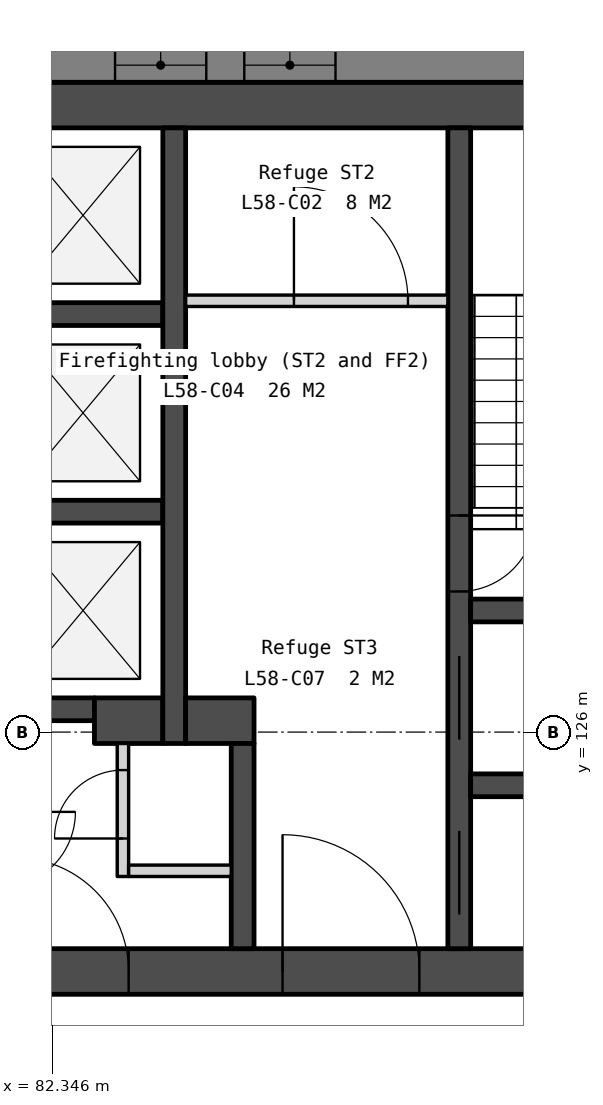
"""IFC4 building model, lengths in metres.
Left out: names, types, materials, properties, quantities, classifications, styles, units other than length and angle.
Written with IfcOpenShell. Run it as: python <this file> out.ifc"""

import sys

from ifc_helpers import new_model, si_unit, direction, frame, frame_2d, origin, place, context, subcontext, project, spatial, polyline, rectangle, outline, extrude, element, fill, save


model = new_model("IFC4")
c1 = context("Model", 3, precision=1e-05, world=origin(), true_north=direction((0.0, 1.0)))
c2 = subcontext(c1, "Body", "Model", "MODEL_VIEW")
j1 = project(units=[si_unit("LENGTHUNIT", "METRE"), si_unit("PLANEANGLEUNIT", "RADIAN")], contexts=[c1])
p1 = place(None, origin())
s1 = spatial("IfcSite", under=j1, at=p1, CompositionType="ELEMENT")
p2 = place(p1, origin())
s2 = spatial("IfcBuilding", under=s1, at=p2, CompositionType="ELEMENT")
p3 = place(p2, frame((0.0, 0.0, 238.7)))
s3 = spatial("IfcBuildingStorey", under=s2, at=p3, CompositionType="ELEMENT", Elevation=238.7)
p4 = place(p3, frame((69.0, 134.25, 0.0), z_axis=(0.0, 0.0, 1.0), x_axis=(1.0, 0.0, 0.0)))
e1 = element("IfcWall", 1, at=p4, inside=s3, PredefinedType="SOLIDWALL", context=c2, shape_type="SweptSolid", body=[
    extrude(rectangle(XDim=22.0, YDim=0.6, at=frame_2d((11.0, 0.0))), origin(), (0.0, 0.0, 1.0), 3.75),
])
p5 = place(p3, frame((69.0, 122.85, 0.0), z_axis=(0.0, 0.0, 1.0), x_axis=(1.0, 0.0, 0.0)))
e2 = element("IfcWall", 2, at=p5, inside=s3, PredefinedType="SOLIDWALL", context=c2, shape_type="SweptSolid", body=[
    extrude(rectangle(XDim=22.0, YDim=0.6, at=frame_2d((11.0, 0.0))), origin(), (0.0, 0.0, 1.0), 3.75),
])
p6 = place(p5, frame((16.375, 0.0, 0.0)))
e3 = element("IfcOpeningElement", 3, at=p6, cuts=e2, PredefinedType="OPENING", context=c2, shape_type="SweptSolid", body=[
    extrude(rectangle(XDim=1.8, YDim=2.1, at=frame_2d((0.9, 1.05))), frame((0.0, 0.31, 0.0), z_axis=(0.0, -1.0, 0.0), x_axis=(1.0, 0.0, 0.0)), (0.0, 0.0, 1.0), 0.62),
])
p7 = place(p5, frame((3.825, 0.0, 0.0)))
e4 = element("IfcOpeningElement", 4, at=p7, cuts=e2, PredefinedType="OPENING", context=c2, shape_type="SweptSolid", body=[
    extrude(rectangle(XDim=1.8, YDim=2.1, at=frame_2d((0.9, 1.05))), frame((0.0, 0.31, 0.0), z_axis=(0.0, -1.0, 0.0), x_axis=(1.0, 0.0, 0.0)), (0.0, 0.0, 1.0), 0.62),
])
p8 = place(p5, frame((12.85, 0.0, 0.0)))
e5 = element("IfcOpeningElement", 5, at=p8, cuts=e2, PredefinedType="OPENING", context=c2, shape_type="SweptSolid", body=[
    extrude(rectangle(XDim=1.5, YDim=2.1, at=frame_2d((0.75, 1.05))), frame((0.0, 0.31, 0.0), z_axis=(0.0, -1.0, 0.0), x_axis=(1.0, 0.0, 0.0)), (0.0, 0.0, 1.0), 0.62),
])
for number, where, z_axis, x_axis in (
    (6, (81.7, 131.5, 0.0), (0.0, 0.0, 1.0), (1.0, 0.0, 0.0)),
    (7, (81.7, 128.9, 0.0), (0.0, 0.0, 1.0), (1.0, 0.0, 0.0)),
):
    element("IfcWall", number, at=place(p3, frame(where, z_axis=z_axis, x_axis=x_axis)), inside=s3, PredefinedType="SOLIDWALL", context=c2, shape_type="SweptSolid", body=[
        extrude(rectangle(XDim=2.1, YDim=0.3, at=frame_2d((1.05, 0.0))), origin(), (0.0, 0.0, 1.0), 3.75),
    ])
p9 = place(p3, frame((81.7, 126.3, 0.0), z_axis=(0.0, 0.0, 1.0), x_axis=(1.0, 0.0, 0.0)))
e8 = element("IfcWall", 8, at=p9, inside=s3, PredefinedType="SOLIDWALL", context=c2, shape_type="SweptSolid", body=[
    extrude(rectangle(XDim=1.2, YDim=0.3, at=frame_2d((0.6, 0.0))), origin(), (0.0, 0.0, 1.0), 3.75),
])
p10 = place(p3, frame((82.9, 126.15, 0.0), z_axis=(0.0, 0.0, 1.0), x_axis=(1.0, 0.0, 0.0)))
e9 = element("IfcWall", 9, at=p10, inside=s3, PredefinedType="SOLIDWALL", context=c2, shape_type="SweptSolid", body=[
    extrude(rectangle(XDim=0.9, YDim=0.6, at=frame_2d((0.45, 0.0))), origin(), (0.0, 0.0, 1.0), 3.75),
])
p11 = place(p3, frame((83.275, 125.85, 0.0), z_axis=(0.0, 0.0, 1.0), x_axis=(0.0, -1.0, 0.0)))
e10 = element("IfcWall", 10, at=p11, inside=s3, PredefinedType="PARTITIONING", context=c2, shape_type="SweptSolid", body=[
    extrude(rectangle(XDim=1.75, YDim=0.15, at=frame_2d((0.875, 0.0))), origin(), (0.0, 0.0, 1.0), 3.75),
])
p12 = place(p11, frame((0.35, 0.0, 0.0)))
e11 = element("IfcOpeningElement", 11, at=p12, cuts=e10, PredefinedType="OPENING", context=c2, shape_type="SweptSolid", body=[
    extrude(rectangle(XDim=0.9, YDim=2.1, at=frame_2d((0.45, 1.05))), frame((0.0, 0.085, 0.0), z_axis=(0.0, -1.0, 0.0), x_axis=(1.0, 0.0, 0.0)), (0.0, 0.0, 1.0), 0.17),
])
p13 = place(p3, frame((83.35, 124.175, 0.0), z_axis=(0.0, 0.0, 1.0), x_axis=(1.0, 0.0, 0.0)))
e12 = element("IfcWall", 12, at=p13, inside=s3, PredefinedType="PARTITIONING", context=c2, shape_type="SweptSolid", body=[
    extrude(rectangle(XDim=1.35, YDim=0.15, at=frame_2d((0.675, 0.0))), origin(), (0.0, 0.0, 1.0), 3.75),
])
p14 = place(p3, frame((83.95, 133.95, 0.0), z_axis=(0.0, 0.0, 1.0), x_axis=(0.0, -1.0, 0.0)))
e13 = element("IfcWall", 13, at=p14, inside=s3, PredefinedType="SOLIDWALL", context=c2, shape_type="SweptSolid", body=[
    extrude(rectangle(XDim=8.1, YDim=0.3, at=frame_2d((4.05, 0.0))), origin(), (0.0, 0.0, 1.0), 3.75),
])
p15 = place(p3, frame((84.1, 131.675, 0.0), z_axis=(0.0, 0.0, 1.0), x_axis=(1.0, 0.0, 0.0)))
e14 = element("IfcWall", 14, at=p15, inside=s3, PredefinedType="PARTITIONING", context=c2, shape_type="SweptSolid", body=[
    extrude(rectangle(XDim=3.45, YDim=0.15, at=frame_2d((1.725, 0.0))), origin(), (0.0, 0.0, 1.0), 3.75),
])
p16 = place(p15, frame((1.425, 0.0, 0.0)))
e15 = element("IfcOpeningElement", 15, at=p16, cuts=e14, PredefinedType="OPENING", context=c2, shape_type="SweptSolid", body=[
    extrude(rectangle(XDim=1.5, YDim=2.1, at=frame_2d((0.75, 1.05))), frame((0.0, 0.085, 0.0), z_axis=(0.0, -1.0, 0.0), x_axis=(1.0, 0.0, 0.0)), (0.0, 0.0, 1.0), 0.17),
])
p17 = place(p3, frame((84.1, 126.15, 0.0), z_axis=(0.0, 0.0, 1.0), x_axis=(1.0, 0.0, 0.0)))
e16 = element("IfcWall", 16, at=p17, inside=s3, PredefinedType="SOLIDWALL", context=c2, shape_type="SweptSolid", body=[
    extrude(rectangle(XDim=0.9, YDim=0.6, at=frame_2d((0.45, 0.0))), origin(), (0.0, 0.0, 1.0), 3.75),
])
p18 = place(p3, frame((84.85, 125.85, 0.0), z_axis=(0.0, 0.0, 1.0), x_axis=(0.0, -1.0, 0.0)))
e17 = element("IfcWall", 17, at=p18, inside=s3, PredefinedType="SOLIDWALL", context=c2, shape_type="SweptSolid", body=[
    extrude(rectangle(XDim=2.7, YDim=0.3, at=frame_2d((1.35, 0.0))), origin(), (0.0, 0.0, 1.0), 3.75),
])
p19 = place(p3, frame((87.7, 133.95, 0.0), z_axis=(0.0, 0.0, 1.0), x_axis=(0.0, -1.0, 0.0)))
e18 = element("IfcWall", 18, at=p19, inside=s3, PredefinedType="SOLIDWALL", context=c2, shape_type="SweptSolid", body=[
    extrude(rectangle(XDim=10.8, YDim=0.3, at=frame_2d((5.4, 0.0))), origin(), (0.0, 0.0, 1.0), 3.75),
])
p20 = place(p19, frame((6.95, 0.0, 0.0)))
e19 = element("IfcOpeningElement", 19, at=p20, cuts=e18, PredefinedType="OPENING", context=c2, shape_type="SweptSolid", body=[
    extrude(rectangle(XDim=1.1, YDim=2.1, at=frame_2d((0.55, 1.05))), frame((0.0, 0.16, 0.0), z_axis=(0.0, -1.0, 0.0), x_axis=(1.0, 0.0, 0.0)), (0.0, 0.0, 1.0), 0.32),
])
p21 = place(p19, frame((5.1, 0.0, 0.0)))
e20 = element("IfcOpeningElement", 20, at=p21, cuts=e18, PredefinedType="OPENING", context=c2, shape_type="SweptSolid", body=[
    extrude(rectangle(XDim=1.0, YDim=2.1, at=frame_2d((0.5, 1.05))), frame((0.0, 0.16, 0.0), z_axis=(0.0, -1.0, 0.0), x_axis=(1.0, 0.0, 0.0)), (0.0, 0.0, 1.0), 0.32),
])
p22 = place(p19, frame((9.25, 0.0, 0.0)))
e21 = element("IfcOpeningElement", 21, at=p22, cuts=e18, PredefinedType="OPENING", context=c2, shape_type="SweptSolid", body=[
    extrude(rectangle(XDim=1.1, YDim=2.1, at=frame_2d((0.55, 1.05))), frame((0.0, 0.16, 0.0), z_axis=(0.0, -1.0, 0.0), x_axis=(1.0, 0.0, 0.0)), (0.0, 0.0, 1.0), 0.32),
])
for number, where, z_axis, x_axis in (
    (22, (87.85, 127.6, 0.0), (0.0, 0.0, 1.0), (1.0, 0.0, 0.0)),
    (23, (87.85, 125.3, 0.0), (0.0, 0.0, 1.0), (1.0, 0.0, 0.0)),
):
    element("IfcWall", number, at=place(p3, frame(where, z_axis=z_axis, x_axis=x_axis)), inside=s3, PredefinedType="SOLIDWALL", context=c2, shape_type="SweptSolid", body=[
        extrude(rectangle(XDim=2.55, YDim=0.3, at=frame_2d((1.275, 0.0))), origin(), (0.0, 0.0, 1.0), 3.75),
    ])
p23 = place(p3, frame((98.486, 134.775, -0.45), z_axis=(0.0, 0.0, 1.0), x_axis=(-1.0, 0.0, 0.0)))
e24 = element("IfcWall", 24, at=p23, inside=s3, PredefinedType="SOLIDWALL", context=c2, shape_type="SweptSolid", body=[
    extrude(outline(polyline([(36.972, 0.0), (36.972, 4.2), (0.0, 4.2), (0.0, 0.0), (36.972, 0.0)])), frame((0.0, 0.225, 0.0), z_axis=(0.0, -1.0, 0.0), x_axis=(1.0, 0.0, 0.0)), (0.0, 0.0, 1.0), 0.45),
])
p24 = place(p23, frame((3.172, 0.0, 1.25)))
e25 = element("IfcOpeningElement", 25, at=p24, cuts=e24, PredefinedType="OPENING", context=c2, shape_type="SweptSolid", body=[
    extrude(rectangle(XDim=1.2, YDim=2.2, at=frame_2d((0.6, 1.1))), frame((0.0, 0.235, 0.0), z_axis=(0.0, -1.0, 0.0), x_axis=(1.0, 0.0, 0.0)), (0.0, 0.0, 1.0), 0.47),
])
p25 = place(p23, frame((4.872, 0.0, 1.25)))
e26 = element("IfcOpeningElement", 26, at=p25, cuts=e24, PredefinedType="OPENING", context=c2, shape_type="SweptSolid", body=[
    extrude(rectangle(XDim=1.2, YDim=2.2, at=frame_2d((0.6, 1.1))), frame((0.0, 0.235, 0.0), z_axis=(0.0, -1.0, 0.0), x_axis=(1.0, 0.0, 0.0)), (0.0, 0.0, 1.0), 0.47),
])
p26 = place(p23, frame((12.415, 0.0, 1.25)))
e27 = element("IfcOpeningElement", 27, at=p26, cuts=e24, PredefinedType="OPENING", context=c2, shape_type="SweptSolid", body=[
    extrude(rectangle(XDim=1.2, YDim=2.2, at=frame_2d((0.6, 1.1))), frame((0.0, 0.235, 0.0), z_axis=(0.0, -1.0, 0.0), x_axis=(1.0, 0.0, 0.0)), (0.0, 0.0, 1.0), 0.47),
])
p27 = place(p23, frame((14.115, 0.0, 1.25)))
e28 = element("IfcOpeningElement", 28, at=p27, cuts=e24, PredefinedType="OPENING", context=c2, shape_type="SweptSolid", body=[
    extrude(rectangle(XDim=1.2, YDim=2.2, at=frame_2d((0.6, 1.1))), frame((0.0, 0.235, 0.0), z_axis=(0.0, -1.0, 0.0), x_axis=(1.0, 0.0, 0.0)), (0.0, 0.0, 1.0), 0.47),
])
p28 = place(p23, frame((21.658, 0.0, 1.25)))
e29 = element("IfcOpeningElement", 29, at=p28, cuts=e24, PredefinedType="OPENING", context=c2, shape_type="SweptSolid", body=[
    extrude(rectangle(XDim=1.2, YDim=2.2, at=frame_2d((0.6, 1.1))), frame((0.0, 0.235, 0.0), z_axis=(0.0, -1.0, 0.0), x_axis=(1.0, 0.0, 0.0)), (0.0, 0.0, 1.0), 0.47),
])
p29 = place(p23, frame((23.358, 0.0, 1.25)))
e30 = element("IfcOpeningElement", 30, at=p29, cuts=e24, PredefinedType="OPENING", context=c2, shape_type="SweptSolid", body=[
    extrude(rectangle(XDim=1.2, YDim=2.2, at=frame_2d((0.6, 1.1))), frame((0.0, 0.235, 0.0), z_axis=(0.0, -1.0, 0.0), x_axis=(1.0, 0.0, 0.0)), (0.0, 0.0, 1.0), 0.47),
])
p30 = place(p23, frame((30.901, 0.0, 1.25)))
e31 = element("IfcOpeningElement", 31, at=p30, cuts=e24, PredefinedType="OPENING", context=c2, shape_type="SweptSolid", body=[
    extrude(rectangle(XDim=1.2, YDim=2.2, at=frame_2d((0.6, 1.1))), frame((0.0, 0.235, 0.0), z_axis=(0.0, -1.0, 0.0), x_axis=(1.0, 0.0, 0.0)), (0.0, 0.0, 1.0), 0.47),
])
p31 = place(p23, frame((32.601, 0.0, 1.25)))
e32 = element("IfcOpeningElement", 32, at=p31, cuts=e24, PredefinedType="OPENING", context=c2, shape_type="SweptSolid", body=[
    extrude(rectangle(XDim=1.2, YDim=2.2, at=frame_2d((0.6, 1.1))), frame((0.0, 0.235, 0.0), z_axis=(0.0, -1.0, 0.0), x_axis=(1.0, 0.0, 0.0)), (0.0, 0.0, 1.0), 0.47),
])
p32 = place(p3, frame((80.905, 101.188, -0.45), z_axis=(0.0, 0.0, 1.0), x_axis=(0.500002536638, 0.866023939251, 0.0)))
e33 = element("IfcWall", 33, at=p32, inside=s3, PredefinedType="SOLIDWALL", context=c2, shape_type="SweptSolid", body=[
    extrude(outline(polyline([(36.972, 0.0), (36.972, 4.2), (0.0, 4.2), (0.0, 0.0), (36.972, 0.0)])), frame((0.0, 0.225, 0.0), z_axis=(0.0, -1.0, 0.0), x_axis=(1.0, 0.0, 0.0)), (0.0, 0.0, 1.0), 0.45),
])
p33 = place(p32, frame((3.172, 0.0, 1.25)))
e34 = element("IfcOpeningElement", 34, at=p33, cuts=e33, PredefinedType="OPENING", context=c2, shape_type="SweptSolid", body=[
    extrude(rectangle(XDim=1.2, YDim=2.2, at=frame_2d((0.6, 1.1))), frame((0.0, 0.235, 0.0), z_axis=(0.0, -1.0, 0.0), x_axis=(1.0, 0.0, 0.0)), (0.0, 0.0, 1.0), 0.47),
])
p34 = place(p32, frame((4.872, 0.0, 1.25)))
e35 = element("IfcOpeningElement", 35, at=p34, cuts=e33, PredefinedType="OPENING", context=c2, shape_type="SweptSolid", body=[
    extrude(rectangle(XDim=1.2, YDim=2.2, at=frame_2d((0.6, 1.1))), frame((0.0, 0.235, 0.0), z_axis=(0.0, -1.0, 0.0), x_axis=(1.0, 0.0, 0.0)), (0.0, 0.0, 1.0), 0.47),
])
p35 = place(p32, frame((12.415, 0.0, 1.25)))
e36 = element("IfcOpeningElement", 36, at=p35, cuts=e33, PredefinedType="OPENING", context=c2, shape_type="SweptSolid", body=[
    extrude(rectangle(XDim=1.2, YDim=2.2, at=frame_2d((0.6, 1.1))), frame((0.0, 0.235, 0.0), z_axis=(0.0, -1.0, 0.0), x_axis=(1.0, 0.0, 0.0)), (0.0, 0.0, 1.0), 0.47),
])
p36 = place(p32, frame((14.115, 0.0, 1.25)))
e37 = element("IfcOpeningElement", 37, at=p36, cuts=e33, PredefinedType="OPENING", context=c2, shape_type="SweptSolid", body=[
    extrude(rectangle(XDim=1.2, YDim=2.2, at=frame_2d((0.6, 1.1))), frame((0.0, 0.235, 0.0), z_axis=(0.0, -1.0, 0.0), x_axis=(1.0, 0.0, 0.0)), (0.0, 0.0, 1.0), 0.47),
])
p37 = place(p32, frame((21.658, 0.0, 1.25)))
e38 = element("IfcOpeningElement", 38, at=p37, cuts=e33, PredefinedType="OPENING", context=c2, shape_type="SweptSolid", body=[
    extrude(rectangle(XDim=1.2, YDim=2.2, at=frame_2d((0.6, 1.1))), frame((0.0, 0.235, 0.0), z_axis=(0.0, -1.0, 0.0), x_axis=(1.0, 0.0, 0.0)), (0.0, 0.0, 1.0), 0.47),
])
p38 = place(p32, frame((23.358, 0.0, 1.25)))
e39 = element("IfcOpeningElement", 39, at=p38, cuts=e33, PredefinedType="OPENING", context=c2, shape_type="SweptSolid", body=[
    extrude(rectangle(XDim=1.2, YDim=2.2, at=frame_2d((0.6, 1.1))), frame((0.0, 0.235, 0.0), z_axis=(0.0, -1.0, 0.0), x_axis=(1.0, 0.0, 0.0)), (0.0, 0.0, 1.0), 0.47),
])
p39 = place(p32, frame((30.901, 0.0, 1.25)))
e40 = element("IfcOpeningElement", 40, at=p39, cuts=e33, PredefinedType="OPENING", context=c2, shape_type="SweptSolid", body=[
    extrude(rectangle(XDim=1.2, YDim=2.2, at=frame_2d((0.6, 1.1))), frame((0.0, 0.235, 0.0), z_axis=(0.0, -1.0, 0.0), x_axis=(1.0, 0.0, 0.0)), (0.0, 0.0, 1.0), 0.47),
])
p40 = place(p32, frame((32.601, 0.0, 1.25)))
e41 = element("IfcOpeningElement", 41, at=p40, cuts=e33, PredefinedType="OPENING", context=c2, shape_type="SweptSolid", body=[
    extrude(rectangle(XDim=1.2, YDim=2.2, at=frame_2d((0.6, 1.1))), frame((0.0, 0.235, 0.0), z_axis=(0.0, -1.0, 0.0), x_axis=(1.0, 0.0, 0.0)), (0.0, 0.0, 1.0), 0.47),
])
p41 = place(p20, origin())
e42 = element("IfcDoor", 42, at=p41, inside=s3, OperationType="SLIDING_TO_LEFT", PredefinedType="DOOR", context=c2, shape_type="SweptSolid", body=[
    extrude(rectangle(XDim=1.1, YDim=2.1, at=frame_2d((0.55, 1.05))), frame((0.0, 0.025, 0.0), z_axis=(0.0, -1.0, 0.0), x_axis=(1.0, 0.0, 0.0)), (0.0, 0.0, 1.0), 0.05),
])
fill(e19, e42)
p42 = place(p6, origin())
e43 = element("IfcDoor", 43, at=p42, inside=s3, OperationType="DOUBLE_DOOR_DOUBLE_SWING", PredefinedType="DOOR", context=c2, shape_type="SweptSolid", body=[
    extrude(rectangle(XDim=1.8, YDim=2.1, at=frame_2d((0.9, 1.05))), frame((0.0, 0.025, 0.0), z_axis=(0.0, -1.0, 0.0), x_axis=(1.0, 0.0, 0.0)), (0.0, 0.0, 1.0), 0.05),
])
fill(e3, e43)
p43 = place(p8, origin())
e44 = element("IfcDoor", 44, at=p43, inside=s3, OperationType="DOUBLE_DOOR_DOUBLE_SWING", PredefinedType="DOOR", context=c2, shape_type="SweptSolid", body=[
    extrude(rectangle(XDim=1.5, YDim=2.1, at=frame_2d((0.75, 1.05))), frame((0.0, 0.025, 0.0), z_axis=(0.0, -1.0, 0.0), x_axis=(1.0, 0.0, 0.0)), (0.0, 0.0, 1.0), 0.05),
])
fill(e5, e44)
p44 = place(p12, origin())
e45 = element("IfcDoor", 45, at=p44, inside=s3, OperationType="SINGLE_SWING_RIGHT", PredefinedType="DOOR", context=c2, shape_type="SweptSolid", body=[
    extrude(rectangle(XDim=0.9, YDim=2.1, at=frame_2d((0.45, 1.05))), frame((0.0, 0.025, 0.0), z_axis=(0.0, -1.0, 0.0), x_axis=(1.0, 0.0, 0.0)), (0.0, 0.0, 1.0), 0.05),
])
fill(e11, e45)
p45 = place(p16, origin())
e46 = element("IfcDoor", 46, at=p45, inside=s3, OperationType="DOUBLE_DOOR_DOUBLE_SWING", PredefinedType="DOOR", context=c2, shape_type="SweptSolid", body=[
    extrude(rectangle(XDim=1.5, YDim=2.1, at=frame_2d((0.75, 1.05))), frame((0.0, 0.025, 0.0), z_axis=(0.0, -1.0, 0.0), x_axis=(1.0, 0.0, 0.0)), (0.0, 0.0, 1.0), 0.05),
])
fill(e15, e46)
p46 = place(p21, origin())
e47 = element("IfcDoor", 47, at=p46, inside=s3, OperationType="SINGLE_SWING_LEFT", PredefinedType="DOOR", context=c2, shape_type="SweptSolid", body=[
    extrude(rectangle(XDim=1.0, YDim=2.1, at=frame_2d((0.5, 1.05))), frame((0.0, 0.025, 0.0), z_axis=(0.0, -1.0, 0.0), x_axis=(1.0, 0.0, 0.0)), (0.0, 0.0, 1.0), 0.05),
])
fill(e20, e47)
p47 = place(p22, origin())
e48 = element("IfcDoor", 48, at=p47, inside=s3, OperationType="SLIDING_TO_LEFT", PredefinedType="DOOR", context=c2, shape_type="SweptSolid", body=[
    extrude(rectangle(XDim=1.1, YDim=2.1, at=frame_2d((0.55, 1.05))), frame((0.0, 0.025, 0.0), z_axis=(0.0, -1.0, 0.0), x_axis=(1.0, 0.0, 0.0)), (0.0, 0.0, 1.0), 0.05),
])
fill(e21, e48)
p48 = place(p26, origin())
e49 = element("IfcWindow", 49, at=p48, inside=s3, PartitioningType="SINGLE_PANEL", PredefinedType="WINDOW", context=c2, shape_type="SweptSolid", body=[
    extrude(rectangle(XDim=1.2, YDim=2.2, at=frame_2d((0.6, 1.1))), frame((0.0, 0.03, 0.0), z_axis=(0.0, -1.0, 0.0), x_axis=(1.0, 0.0, 0.0)), (0.0, 0.0, 1.0), 0.06),
])
fill(e27, e49)
p49 = place(p27, origin())
e50 = element("IfcWindow", 50, at=p49, inside=s3, PartitioningType="SINGLE_PANEL", PredefinedType="WINDOW", context=c2, shape_type="SweptSolid", body=[
    extrude(rectangle(XDim=1.2, YDim=2.2, at=frame_2d((0.6, 1.1))), frame((0.0, 0.03, 0.0), z_axis=(0.0, -1.0, 0.0), x_axis=(1.0, 0.0, 0.0)), (0.0, 0.0, 1.0), 0.06),
])
fill(e28, e50)
save(model, sys.argv[1])
